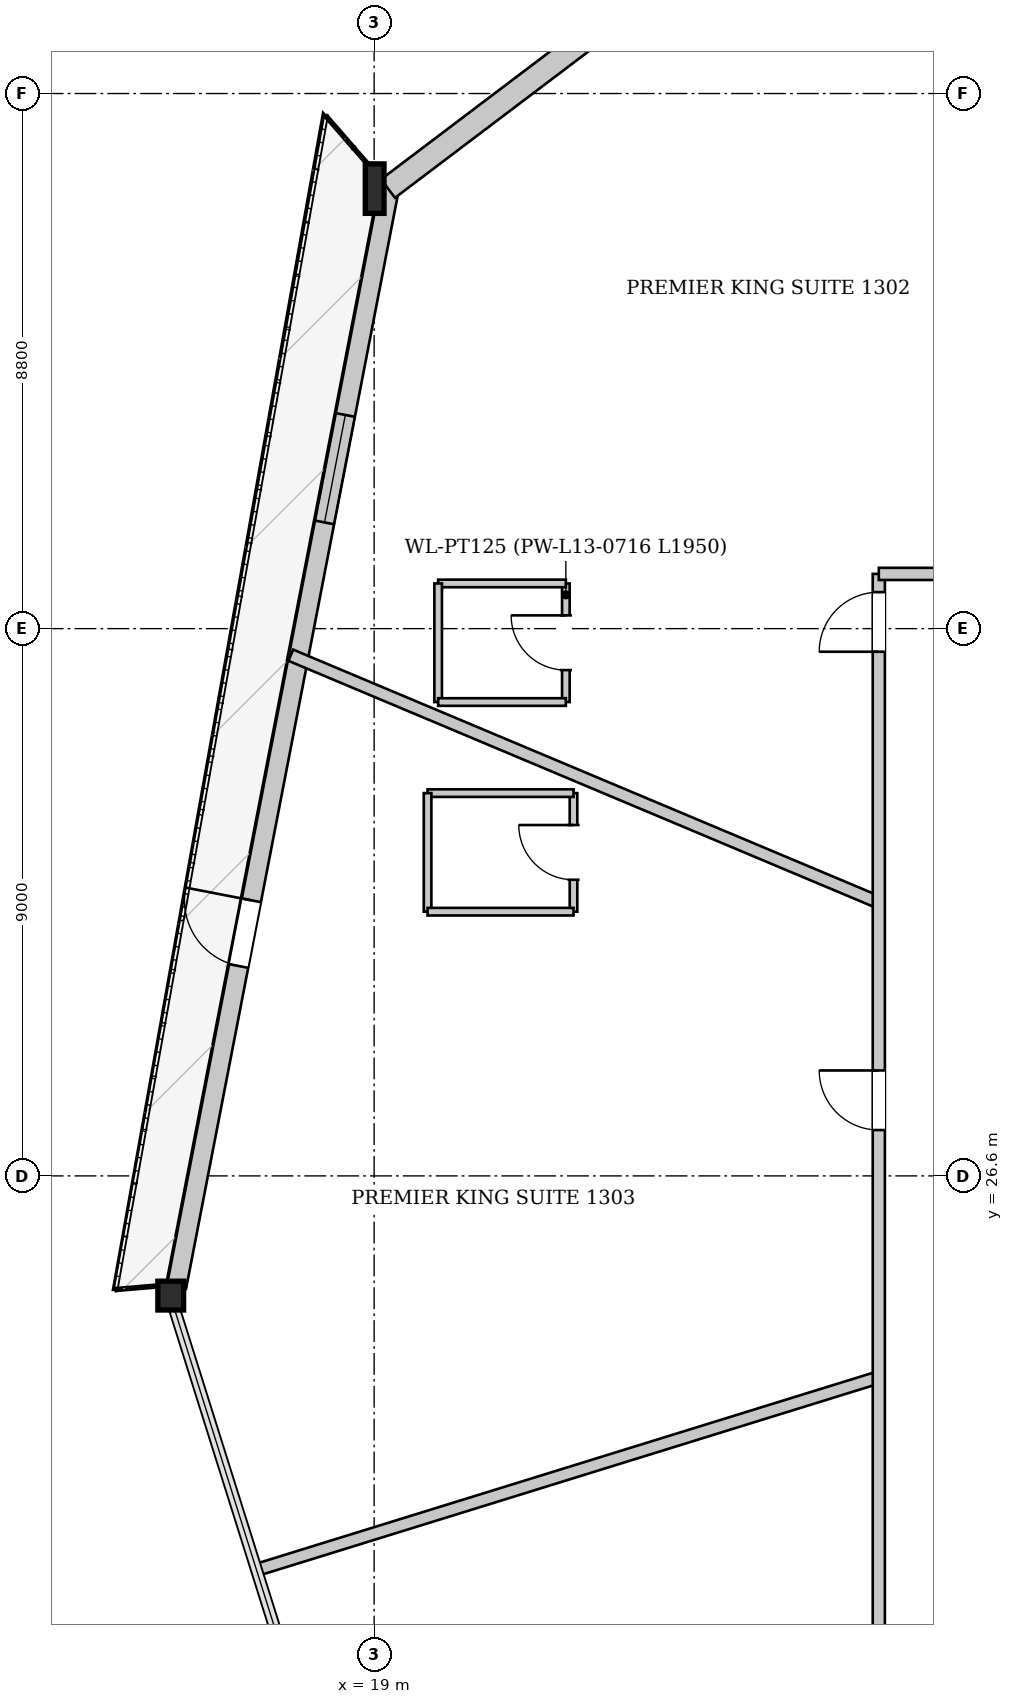
"""IFC4 building model, lengths in metres.
Left out: names, types, materials, properties, quantities, classifications, styles, units other than length and angle.
Written with IfcOpenShell. Run it as: python <this file> out.ifc"""

import sys

from ifc_helpers import new_model, si_unit, direction, frame, frame_2d, origin, origin_2d, place, context, subcontext, project, spatial, rectangle, i_section, extrude, source, transform, mapped, element, fill, save


model = new_model("IFC4")
c1 = context("Model", 3, precision=1e-05, world=origin(), true_north=direction((0.0, 1.0)))
c2 = subcontext(c1, "Body", "Model", "MODEL_VIEW")
j1 = project(units=[si_unit("LENGTHUNIT", "METRE"), si_unit("PLANEANGLEUNIT", "RADIAN")], contexts=[c1])
p1 = place(None, origin())
s1 = spatial("IfcSite", under=j1, at=p1, CompositionType="ELEMENT")
p2 = place(p1, origin())
s2 = spatial("IfcBuilding", under=s1, at=p2, CompositionType="ELEMENT")
p3 = place(p2, frame((0.0, 0.0, 54.15)))
s3 = spatial("IfcBuildingStorey", under=s2, at=p3, CompositionType="ELEMENT", Elevation=54.15)
m1 = source(origin(), c2, "Body", "SweptSolid", [
    extrude(i_section(OverallWidth=0.308, OverallDepth=0.814, WebThickness=0.021, FlangeThickness=0.04, at=origin_2d()), origin(), (0.0, 0.0, 1.0), 3.405),
])
p4 = place(p3, frame((19.114, 42.988, 0.0), z_axis=(-0.061873656803, -0.08947662073, 0.994065181433), x_axis=(0.822500508627, -0.568764374155, 0.0)))
e1 = element("IfcColumn", 1, at=p4, inside=s3, PredefinedType="COLUMN", context=c2, shape_type="MappedRepresentation", body=[
    mapped(m1, transform((0.0, 0.0, 0.0), x_axis=(1.0, 0.0, 0.0), y_axis=(0.0, 1.0, 0.0), z_axis=(0.0, 0.0, 1.0), scale=1.0)),
])
m2 = source(origin(), c2, "Body", "SweptSolid", [
    extrude(i_section(OverallWidth=0.424, OverallDepth=0.474, WebThickness=0.043, FlangeThickness=0.068, at=origin_2d()), origin(), (0.0, 0.0, 1.0), 3.405),
])
p5 = place(p3, frame((15.592, 24.804, 0.0), z_axis=(0.036713798913, -0.10096294701, 0.99421254282), x_axis=(0.939793423488, 0.341743063087, 0.0)))
e2 = element("IfcColumn", 2, at=p5, inside=s3, PredefinedType="COLUMN", context=c2, shape_type="MappedRepresentation", body=[
    mapped(m2, transform((0.0, 0.0, 0.0), x_axis=(1.0, 0.0, 0.0), y_axis=(0.0, 1.0, 0.0), z_axis=(0.0, 0.0, 1.0), scale=1.0)),
])
p6 = place(p3, frame((15.75, 24.773, 0.0), z_axis=(0.0, 0.0, 1.0), x_axis=(0.19010756161, 0.981763268318, 0.0)))
e3 = element("IfcWall", 3, at=p6, inside=s3, PredefinedType="SOLIDWALL", context=c2, shape_type="SweptSolid", body=[
    extrude(rectangle(XDim=18.522, YDim=0.32, at=frame_2d((9.261, 0.0))), origin(), (0.0, 0.0, 1.0), 2.592),
])
p7 = place(p6, frame((5.377, 0.0, 0.0)))
e4 = element("IfcOpeningElement", 4, at=p7, cuts=e3, PredefinedType="OPENING", context=c2, shape_type="SweptSolid", body=[
    extrude(rectangle(XDim=1.1, YDim=2.3, at=frame_2d((0.55, 1.15))), frame((0.0, 0.17, 0.0), z_axis=(0.0, -1.0, 0.0), x_axis=(1.0, 0.0, 0.0)), (0.0, 0.0, 1.0), 0.34),
])
p8 = place(p6, frame((12.807, 0.0, 0.272)))
e5 = element("IfcOpeningElement", 5, at=p8, cuts=e3, PredefinedType="OPENING", context=c2, shape_type="SweptSolid", body=[
    extrude(rectangle(XDim=1.8, YDim=2.2, at=frame_2d((0.9, 1.1))), frame((0.0, 0.17, 0.0), z_axis=(0.0, -1.0, 0.0), x_axis=(1.0, 0.0, 0.0)), (0.0, 0.0, 1.0), 0.34),
])
p9 = place(p3, frame((19.228, 42.837, 0.0), z_axis=(0.0, 0.0, 1.0), x_axis=(0.797566297219, 0.6032313002, 0.0)))
e6 = element("IfcWall", 6, at=p9, inside=s3, PredefinedType="SOLIDWALL", context=c2, shape_type="SweptSolid", body=[
    extrude(rectangle(XDim=6.313, YDim=0.38, at=frame_2d((3.156, 0.0))), origin(), (0.0, 0.0, 1.0), 2.592),
])
p10 = place(p3, frame((27.3, 31.098, 0.0), z_axis=(0.0, 0.0, 1.0), x_axis=(-0.92186956873, 0.387500320322, 0.0)))
e7 = element("IfcWall", 7, at=p10, inside=s3, PredefinedType="PARTITIONING", context=c2, shape_type="SweptSolid", body=[
    extrude(rectangle(XDim=10.491, YDim=0.2, at=frame_2d((5.245, 0.0))), origin(), (0.0, 0.0, 1.0), 3.3),
])
p11 = place(p3, frame((27.3, 23.288, 0.0), z_axis=(0.0, 0.0, 1.0), x_axis=(-0.955277591085, -0.295710540851, 0.0)))
e8 = element("IfcWall", 8, at=p11, inside=s3, PredefinedType="PARTITIONING", context=c2, shape_type="SweptSolid", body=[
    extrude(rectangle(XDim=10.683, YDim=0.2, at=frame_2d((5.342, 0.0))), origin(), (0.0, 0.0, 1.0), 3.3),
])
p12 = place(p3, frame((22.153, 34.393, 0.0), z_axis=(0.0, 0.0, 1.0), x_axis=(0.0, 1.0, 0.0)))
e9 = element("IfcWall", 9, at=p12, inside=s3, PredefinedType="PARTITIONING", context=c2, shape_type="SweptSolid", body=[
    extrude(rectangle(XDim=1.95, YDim=0.125, at=frame_2d((0.975, 0.0))), origin(), (0.0, 0.0, 1.0), 3.3),
])
p13 = place(p12, frame((0.525, 0.0, 0.0)))
e10 = element("IfcOpeningElement", 10, at=p13, cuts=e9, PredefinedType="OPENING", context=c2, shape_type="SweptSolid", body=[
    extrude(rectangle(XDim=0.9, YDim=2.1, at=frame_2d((0.45, 1.05))), frame((0.0, 0.073, 0.0), z_axis=(0.0, -1.0, 0.0), x_axis=(1.0, 0.0, 0.0)), (0.0, 0.0, 1.0), 0.145),
])
p14 = place(p3, frame((22.153, 36.343, 0.0), z_axis=(0.0, 0.0, 1.0), x_axis=(-1.0, 0.0, 0.0)))
e11 = element("IfcWall", 11, at=p14, inside=s3, PredefinedType="PARTITIONING", context=c2, shape_type="SweptSolid", body=[
    extrude(rectangle(XDim=2.1, YDim=0.125, at=frame_2d((1.05, 0.0))), origin(), (0.0, 0.0, 1.0), 3.3),
])
p15 = place(p3, frame((20.053, 36.343, 0.0), z_axis=(0.0, 0.0, 1.0), x_axis=(0.0, -1.0, 0.0)))
e12 = element("IfcWall", 12, at=p15, inside=s3, PredefinedType="PARTITIONING", context=c2, shape_type="SweptSolid", body=[
    extrude(rectangle(XDim=1.95, YDim=0.125, at=frame_2d((0.975, 0.0))), origin(), (0.0, 0.0, 1.0), 3.3),
])
p16 = place(p3, frame((20.053, 34.393, 0.0), z_axis=(0.0, 0.0, 1.0), x_axis=(1.0, 0.0, 0.0)))
e13 = element("IfcWall", 13, at=p16, inside=s3, PredefinedType="PARTITIONING", context=c2, shape_type="SweptSolid", body=[
    extrude(rectangle(XDim=2.1, YDim=0.125, at=frame_2d((1.05, 0.0))), origin(), (0.0, 0.0, 1.0), 3.3),
])
p17 = place(p3, frame((22.279, 30.945, 0.0), z_axis=(0.0, 0.0, 1.0), x_axis=(0.0, 1.0, 0.0)))
e14 = element("IfcWall", 14, at=p17, inside=s3, PredefinedType="PARTITIONING", context=c2, shape_type="SweptSolid", body=[
    extrude(rectangle(XDim=1.95, YDim=0.125, at=frame_2d((0.975, 0.0))), origin(), (0.0, 0.0, 1.0), 3.045),
])
p18 = place(p17, frame((0.525, 0.0, 0.0)))
e15 = element("IfcOpeningElement", 15, at=p18, cuts=e14, PredefinedType="OPENING", context=c2, shape_type="SweptSolid", body=[
    extrude(rectangle(XDim=0.9, YDim=2.1, at=frame_2d((0.45, 1.05))), frame((0.0, 0.073, 0.0), z_axis=(0.0, -1.0, 0.0), x_axis=(1.0, 0.0, 0.0)), (0.0, 0.0, 1.0), 0.145),
])
p19 = place(p3, frame((22.279, 32.895, 0.0), z_axis=(0.0, 0.0, 1.0), x_axis=(-1.0, 0.0, 0.0)))
e16 = element("IfcWall", 16, at=p19, inside=s3, PredefinedType="PARTITIONING", context=c2, shape_type="SweptSolid", body=[
    extrude(rectangle(XDim=2.4, YDim=0.125, at=frame_2d((1.2, 0.0))), origin(), (0.0, 0.0, 1.0), 3.3),
])
p20 = place(p3, frame((19.879, 32.895, 0.0), z_axis=(0.0, 0.0, 1.0), x_axis=(0.0, -1.0, 0.0)))
e17 = element("IfcWall", 17, at=p20, inside=s3, PredefinedType="PARTITIONING", context=c2, shape_type="SweptSolid", body=[
    extrude(rectangle(XDim=1.95, YDim=0.125, at=frame_2d((0.975, 0.0))), origin(), (0.0, 0.0, 1.0), 3.3),
])
p21 = place(p3, frame((19.879, 30.945, 0.0), z_axis=(0.0, 0.0, 1.0), x_axis=(1.0, 0.0, 0.0)))
e18 = element("IfcWall", 18, at=p21, inside=s3, PredefinedType="PARTITIONING", context=c2, shape_type="SweptSolid", body=[
    extrude(rectangle(XDim=2.4, YDim=0.125, at=frame_2d((1.2, 0.0))), origin(), (0.0, 0.0, 1.0), 3.3),
])
p22 = place(p3, frame((27.3, 16.7, 0.0), z_axis=(0.0, 0.0, 1.0), x_axis=(0.0, 1.0, 0.0)))
e19 = element("IfcWall", 19, at=p22, inside=s3, PredefinedType="PARTITIONING", context=c2, shape_type="SweptSolid", body=[
    extrude(rectangle(XDim=19.8, YDim=0.2, at=frame_2d((9.9, 0.0))), origin(), (0.0, 0.0, 1.0), 3.3),
])
p23 = place(p22, frame((18.52, 0.0, 0.0)))
e20 = element("IfcOpeningElement", 20, at=p23, cuts=e19, PredefinedType="OPENING", context=c2, shape_type="SweptSolid", body=[
    extrude(rectangle(XDim=0.98, YDim=2.15, at=frame_2d((0.49, 1.075))), frame((0.0, 0.11, 0.0), z_axis=(0.0, -1.0, 0.0), x_axis=(1.0, 0.0, 0.0)), (0.0, 0.0, 1.0), 0.22),
])
p24 = place(p22, frame((10.654, 0.0, 0.0)))
e21 = element("IfcOpeningElement", 21, at=p24, cuts=e19, PredefinedType="OPENING", context=c2, shape_type="SweptSolid", body=[
    extrude(rectangle(XDim=0.98, YDim=2.15, at=frame_2d((0.49, 1.075))), frame((0.0, 0.11, 0.0), z_axis=(0.0, -1.0, 0.0), x_axis=(1.0, 0.0, 0.0)), (0.0, 0.0, 1.0), 0.22),
])
p25 = place(p3, frame((27.3, 36.5, 0.0), z_axis=(0.0, 0.0, 1.0), x_axis=(1.0, 0.0, 0.0)))
e22 = element("IfcWall", 22, at=p25, inside=s3, PredefinedType="PARTITIONING", context=c2, shape_type="SweptSolid", body=[
    extrude(rectangle(XDim=21.4, YDim=0.2, at=frame_2d((10.7, 0.0))), origin(), (0.0, 0.0, 1.0), 3.3),
])
p26 = place(p25, frame((20.12, 0.0, 0.0)))
e23 = element("IfcOpeningElement", 23, at=p26, cuts=e22, PredefinedType="OPENING", context=c2, shape_type="SweptSolid", body=[
    extrude(rectangle(XDim=0.98, YDim=2.15, at=frame_2d((0.49, 1.075))), frame((0.0, 0.11, 0.0), z_axis=(0.0, -1.0, 0.0), x_axis=(1.0, 0.0, 0.0)), (0.0, 0.0, 1.0), 0.22),
])
m3 = source(origin(), c2, "Body", "SweptSolid", [
    extrude(rectangle(XDim=1.1, YDim=2.3, at=frame_2d((0.55, 1.15))), frame((0.0, 0.025, 0.0), z_axis=(0.0, -1.0, 0.0), x_axis=(1.0, 0.0, 0.0)), (0.0, 0.0, 1.0), 0.05),
])
p27 = place(p7, origin())
e24 = element("IfcDoor", 24, at=p27, inside=s3, OperationType="SINGLE_SWING_RIGHT", PredefinedType="DOOR", context=c2, shape_type="MappedRepresentation", body=[
    mapped(m3, transform((0.0, 0.0, 0.0), x_axis=(1.0, 0.0, 0.0), y_axis=(0.0, 1.0, 0.0), z_axis=(0.0, 0.0, 1.0), scale=1.0)),
])
fill(e4, e24)
m4 = source(origin(), c2, "Body", "SweptSolid", [
    extrude(rectangle(XDim=1.8, YDim=2.2, at=frame_2d((0.9, 1.1))), frame((0.0, 0.03, 0.0), z_axis=(0.0, -1.0, 0.0), x_axis=(1.0, 0.0, 0.0)), (0.0, 0.0, 1.0), 0.06),
])
p28 = place(p8, origin())
e25 = element("IfcWindow", 25, at=p28, inside=s3, PartitioningType="SINGLE_PANEL", PredefinedType="WINDOW", context=c2, shape_type="MappedRepresentation", body=[
    mapped(m4, transform((0.0, 0.0, 0.0), x_axis=(1.0, 0.0, 0.0), y_axis=(0.0, 1.0, 0.0), z_axis=(0.0, 0.0, 1.0), scale=1.0)),
])
fill(e5, e25)
m5 = source(origin(), c2, "Body", "SweptSolid", [
    extrude(rectangle(XDim=0.9, YDim=2.1, at=frame_2d((0.45, 1.05))), frame((0.0, 0.025, 0.0), z_axis=(0.0, -1.0, 0.0), x_axis=(1.0, 0.0, 0.0)), (0.0, 0.0, 1.0), 0.05),
])
p29 = place(p13, origin())
e26 = element("IfcDoor", 26, at=p29, inside=s3, OperationType="SINGLE_SWING_RIGHT", PredefinedType="DOOR", context=c2, shape_type="MappedRepresentation", body=[
    mapped(m5, transform((0.0, 0.0, 0.0), x_axis=(1.0, 0.0, 0.0), y_axis=(0.0, 1.0, 0.0), z_axis=(0.0, 0.0, 1.0), scale=1.0)),
])
fill(e10, e26)
p30 = place(p18, origin())
e27 = element("IfcDoor", 27, at=p30, inside=s3, OperationType="SINGLE_SWING_RIGHT", PredefinedType="DOOR", context=c2, shape_type="MappedRepresentation", body=[
    mapped(m5, transform((0.0, 0.0, 0.0), x_axis=(1.0, 0.0, 0.0), y_axis=(0.0, 1.0, 0.0), z_axis=(0.0, 0.0, 1.0), scale=1.0)),
])
fill(e15, e27)
m6 = source(origin(), c2, "Body", "SweptSolid", [
    extrude(rectangle(XDim=0.98, YDim=2.15, at=frame_2d((0.49, 1.075))), frame((0.0, 0.025, 0.0), z_axis=(0.0, -1.0, 0.0), x_axis=(1.0, 0.0, 0.0)), (0.0, 0.0, 1.0), 0.05),
])
p31 = place(p23, origin())
e28 = element("IfcDoor", 28, at=p31, inside=s3, OperationType="SINGLE_SWING_LEFT", PredefinedType="DOOR", context=c2, shape_type="MappedRepresentation", body=[
    mapped(m6, transform((0.0, 0.0, 0.0), x_axis=(1.0, 0.0, 0.0), y_axis=(0.0, 1.0, 0.0), z_axis=(0.0, 0.0, 1.0), scale=1.0)),
])
fill(e20, e28)
p32 = place(p24, origin())
e29 = element("IfcDoor", 29, at=p32, inside=s3, OperationType="SINGLE_SWING_RIGHT", PredefinedType="DOOR", context=c2, shape_type="MappedRepresentation", body=[
    mapped(m6, transform((0.0, 0.0, 0.0), x_axis=(1.0, 0.0, 0.0), y_axis=(0.0, 1.0, 0.0), z_axis=(0.0, 0.0, 1.0), scale=1.0)),
])
fill(e21, e29)
save(model, sys.argv[1])
